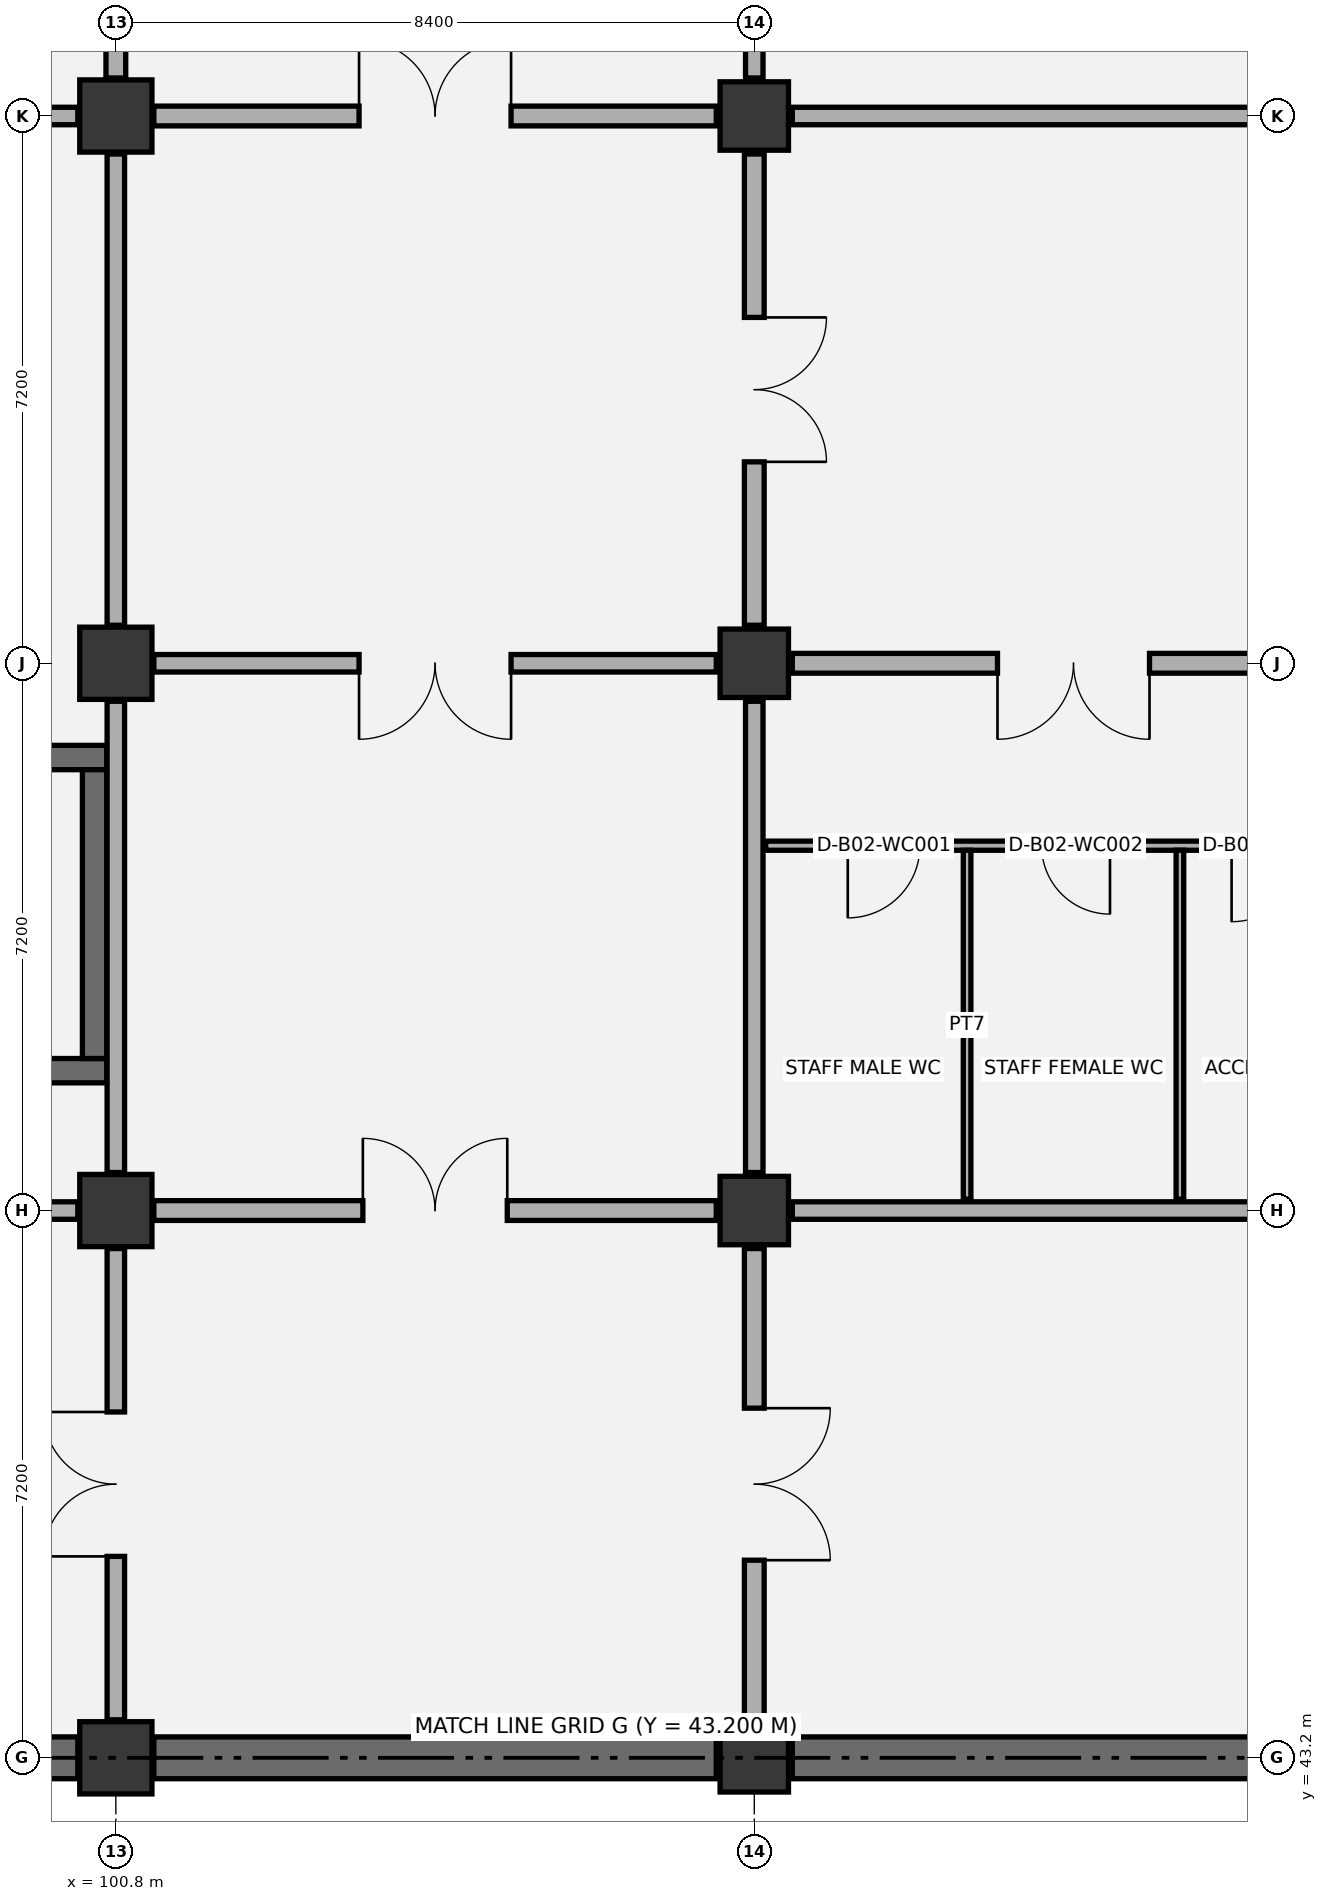
"""IFC4 building model, lengths in metres.
Left out: names, types, materials, properties, quantities, classifications, styles, units other than length and angle.
Written with IfcOpenShell. Run it as: python <this file> out.ifc"""

import sys

from ifc_helpers import new_model, si_unit, direction, frame, frame_2d, origin, origin_2d, place, context, subcontext, project, spatial, rectangle, extrude, element, fill, save


model = new_model("IFC4")
c1 = context("Model", 3, precision=1e-05, world=origin(), true_north=direction((0.0, 1.0)))
c2 = subcontext(c1, "Body", "Model", "MODEL_VIEW")
j1 = project(units=[si_unit("LENGTHUNIT", "METRE"), si_unit("PLANEANGLEUNIT", "RADIAN")], contexts=[c1])
p1 = place(None, origin())
s1 = spatial("IfcSite", under=j1, at=p1, CompositionType="ELEMENT")
p2 = place(p1, origin())
s2 = spatial("IfcBuilding", under=s1, at=p2, CompositionType="ELEMENT")
p3 = place(p2, frame((0.0, 0.0, -9.6)))
s3 = spatial("IfcBuildingStorey", under=s2, at=p3, CompositionType="ELEMENT", Elevation=-9.6)
for number, where, z_axis, x_axis in (
    (1, (100.8, 43.2, 0.0), (0.0, 0.0, 1.0), (1.0, 0.0, 0.0)),
    (2, (100.8, 50.4, 0.0), (0.0, 0.0, 1.0), (1.0, 0.0, 0.0)),
    (3, (100.8, 57.6, 0.0), (0.0, 0.0, 1.0), (1.0, 0.0, 0.0)),
    (4, (100.8, 64.8, 0.0), (0.0, 0.0, 1.0), (1.0, 0.0, 0.0)),
):
    element("IfcColumn", number, at=place(p3, frame(where, z_axis=z_axis, x_axis=x_axis)), inside=s3, PredefinedType="COLUMN", context=c2, shape_type="SweptSolid", body=[
        extrude(rectangle(XDim=0.95, YDim=0.95, at=origin_2d()), origin(), (0.0, 0.0, 1.0), 4.8),
    ])
for number, where, z_axis, x_axis in (
    (5, (109.2, 43.2, 0.0), (0.0, 0.0, 1.0), (1.0, 0.0, 0.0)),
    (6, (109.2, 50.4, 0.0), (0.0, 0.0, 1.0), (1.0, 0.0, 0.0)),
    (7, (109.2, 57.6, 0.0), (0.0, 0.0, 1.0), (1.0, 0.0, 0.0)),
    (8, (109.2, 64.8, 0.0), (0.0, 0.0, 1.0), (1.0, 0.0, 0.0)),
):
    element("IfcColumn", number, at=place(p3, frame(where, z_axis=z_axis, x_axis=x_axis)), inside=s3, PredefinedType="COLUMN", context=c2, shape_type="SweptSolid", body=[
        extrude(rectangle(XDim=0.9, YDim=0.9, at=origin_2d()), origin(), (0.0, 0.0, 1.0), 4.8),
    ])
p4 = place(p3, frame((92.9, 43.2, 0.0), z_axis=(0.0, 0.0, 1.0), x_axis=(1.0, 0.0, 0.0)))
e9 = element("IfcWall", 9, at=p4, inside=s3, PredefinedType="USERDEFINED", context=c2, shape_type="SweptSolid", body=[
    extrude(rectangle(XDim=7.4, YDim=0.55, at=frame_2d((3.7, 0.0))), origin(), (0.0, 0.0, 1.0), 4.4),
])
p5 = place(p3, frame((101.3, 43.2, 0.0), z_axis=(0.0, 0.0, 1.0), x_axis=(1.0, 0.0, 0.0)))
e10 = element("IfcWall", 10, at=p5, inside=s3, PredefinedType="USERDEFINED", context=c2, shape_type="SweptSolid", body=[
    extrude(rectangle(XDim=7.4, YDim=0.55, at=frame_2d((3.7, 0.0))), origin(), (0.0, 0.0, 1.0), 4.4),
])
p6 = place(p3, frame((109.7, 43.2, 0.0), z_axis=(0.0, 0.0, 1.0), x_axis=(1.0, 0.0, 0.0)))
e11 = element("IfcWall", 11, at=p6, inside=s3, PredefinedType="USERDEFINED", context=c2, shape_type="SweptSolid", body=[
    extrude(rectangle(XDim=7.4, YDim=0.55, at=frame_2d((3.7, 0.0))), origin(), (0.0, 0.0, 1.0), 4.4),
])
p7 = place(p3, frame((93.2, 52.24, 0.0), z_axis=(0.0, 0.0, 1.0), x_axis=(1.0, 0.0, 0.0)))
e12 = element("IfcWall", 12, at=p7, inside=s3, PredefinedType="SHEAR", context=c2, shape_type="SweptSolid", body=[
    extrude(rectangle(XDim=7.48, YDim=0.32, at=frame_2d((3.74, 0.0))), origin(), (0.0, 0.0, 1.0), 4.4),
])
p8 = place(p7, frame((0.45, 0.0, 0.0)))
e13 = element("IfcOpeningElement", 13, at=p8, cuts=e12, PredefinedType="OPENING", context=c2, shape_type="SweptSolid", body=[
    extrude(rectangle(XDim=1.05, YDim=2.15, at=frame_2d((0.525, 1.075))), frame((0.0, 0.17, 0.0), z_axis=(0.0, -1.0, 0.0), x_axis=(1.0, 0.0, 0.0)), (0.0, 0.0, 1.0), 0.34),
])
p9 = place(p3, frame((93.2, 56.36, 0.0), z_axis=(0.0, 0.0, 1.0), x_axis=(1.0, 0.0, 0.0)))
e14 = element("IfcWall", 14, at=p9, inside=s3, PredefinedType="SHEAR", context=c2, shape_type="SweptSolid", body=[
    extrude(rectangle(XDim=7.48, YDim=0.32, at=frame_2d((3.74, 0.0))), origin(), (0.0, 0.0, 1.0), 4.4),
])
p10 = place(p3, frame((100.52, 52.4, 0.0), z_axis=(0.0, 0.0, 1.0), x_axis=(0.0, 1.0, 0.0)))
e15 = element("IfcWall", 15, at=p10, inside=s3, PredefinedType="SHEAR", context=c2, shape_type="SweptSolid", body=[
    extrude(rectangle(XDim=3.8, YDim=0.32, at=frame_2d((1.9, 0.0))), origin(), (0.0, 0.0, 1.0), 4.4),
])
p11 = place(p3, frame((109.35, 55.2, 0.0), z_axis=(0.0, 0.0, 1.0), x_axis=(1.0, 0.0, 0.0)))
e16 = element("IfcWall", 16, at=p11, inside=s3, PredefinedType="PARTITIONING", context=c2, shape_type="SweptSolid", body=[
    extrude(rectangle(XDim=8.1, YDim=0.12, at=frame_2d((4.05, 0.0))), origin(), (0.0, 0.0, 1.0), 4.4),
])
p12 = place(p11, frame((1.08, 0.0, 0.0)))
e17 = element("IfcOpeningElement", 17, at=p12, cuts=e16, PredefinedType="OPENING", context=c2, shape_type="SweptSolid", body=[
    extrude(rectangle(XDim=0.95, YDim=2.1, at=frame_2d((0.475, 1.05))), frame((0.0, 0.07, 0.0), z_axis=(0.0, -1.0, 0.0), x_axis=(1.0, 0.0, 0.0)), (0.0, 0.0, 1.0), 0.14),
])
p13 = place(p11, frame((3.63, 0.0, 0.0)))
e18 = element("IfcOpeningElement", 18, at=p13, cuts=e16, PredefinedType="OPENING", context=c2, shape_type="SweptSolid", body=[
    extrude(rectangle(XDim=0.9, YDim=2.1, at=frame_2d((0.45, 1.05))), frame((0.0, 0.07, 0.0), z_axis=(0.0, -1.0, 0.0), x_axis=(1.0, 0.0, 0.0)), (0.0, 0.0, 1.0), 0.14),
])
p14 = place(p11, frame((6.13, 0.0, 0.0)))
e19 = element("IfcOpeningElement", 19, at=p14, cuts=e16, PredefinedType="OPENING", context=c2, shape_type="SweptSolid", body=[
    extrude(rectangle(XDim=1.0, YDim=2.1, at=frame_2d((0.5, 1.05))), frame((0.0, 0.07, 0.0), z_axis=(0.0, -1.0, 0.0), x_axis=(1.0, 0.0, 0.0)), (0.0, 0.0, 1.0), 0.14),
])
for number, where, z_axis, x_axis in (
    (20, (112.0, 50.55, 0.0), (0.0, 0.0, 1.0), (0.0, 1.0, 0.0)),
    (21, (114.8, 50.55, 0.0), (0.0, 0.0, 1.0), (0.0, 1.0, 0.0)),
):
    element("IfcWall", number, at=place(p3, frame(where, z_axis=z_axis, x_axis=x_axis)), inside=s3, PredefinedType="PARTITIONING", context=c2, shape_type="SweptSolid", body=[
        extrude(rectangle(XDim=4.59, YDim=0.1, at=frame_2d((2.295, 0.0))), origin(), (0.0, 0.0, 1.0), 4.4),
    ])
p15 = place(p3, frame((100.8, 43.7, 0.0), z_axis=(0.0, 0.0, 1.0), x_axis=(0.0, 1.0, 0.0)))
e22 = element("IfcWall", 22, at=p15, inside=s3, PredefinedType="PARTITIONING", context=c2, shape_type="SweptSolid", body=[
    extrude(rectangle(XDim=6.2, YDim=0.23, at=frame_2d((3.1, 0.0))), origin(), (0.0, 0.0, 1.0), 3.595),
])
p16 = place(p15, frame((2.15, 0.0, 0.0)))
e23 = element("IfcOpeningElement", 23, at=p16, cuts=e22, PredefinedType="OPENING", context=c2, shape_type="SweptSolid", body=[
    extrude(rectangle(XDim=1.9, YDim=2.3, at=frame_2d((0.95, 1.15))), frame((0.0, 0.125, 0.0), z_axis=(0.0, -1.0, 0.0), x_axis=(1.0, 0.0, 0.0)), (0.0, 0.0, 1.0), 0.25),
])
p17 = place(p3, frame((92.9, 50.4, 0.0), z_axis=(0.0, 0.0, 1.0), x_axis=(1.0, 0.0, 0.0)))
e24 = element("IfcWall", 24, at=p17, inside=s3, PredefinedType="PARTITIONING", context=c2, shape_type="SweptSolid", body=[
    extrude(rectangle(XDim=7.4, YDim=0.23, at=frame_2d((3.7, 0.0))), origin(), (0.0, 0.0, 1.0), 3.495),
])
p18 = place(p17, frame((2.95, 0.0, 0.0)))
e25 = element("IfcOpeningElement", 25, at=p18, cuts=e24, PredefinedType="OPENING", context=c2, shape_type="SweptSolid", body=[
    extrude(rectangle(XDim=1.5, YDim=2.15, at=frame_2d((0.75, 1.075))), frame((0.0, 0.125, 0.0), z_axis=(0.0, -1.0, 0.0), x_axis=(1.0, 0.0, 0.0)), (0.0, 0.0, 1.0), 0.25),
])
p19 = place(p3, frame((100.8, 50.9, 0.0), z_axis=(0.0, 0.0, 1.0), x_axis=(0.0, 1.0, 0.0)))
e26 = element("IfcWall", 26, at=p19, inside=s3, PredefinedType="PARTITIONING", context=c2, shape_type="SweptSolid", body=[
    extrude(rectangle(XDim=6.2, YDim=0.23, at=frame_2d((3.1, 0.0))), origin(), (0.0, 0.0, 1.0), 3.595),
])
p20 = place(p3, frame((100.8, 58.1, 0.0), z_axis=(0.0, 0.0, 1.0), x_axis=(0.0, 1.0, 0.0)))
e27 = element("IfcWall", 27, at=p20, inside=s3, PredefinedType="PARTITIONING", context=c2, shape_type="SweptSolid", body=[
    extrude(rectangle(XDim=6.2, YDim=0.23, at=frame_2d((3.1, 0.0))), origin(), (0.0, 0.0, 1.0), 3.595),
])
p21 = place(p3, frame((92.9, 64.8, 0.0), z_axis=(0.0, 0.0, 1.0), x_axis=(1.0, 0.0, 0.0)))
e28 = element("IfcWall", 28, at=p21, inside=s3, PredefinedType="PARTITIONING", context=c2, shape_type="SweptSolid", body=[
    extrude(rectangle(XDim=7.4, YDim=0.23, at=frame_2d((3.7, 0.0))), origin(), (0.0, 0.0, 1.0), 3.495),
])
p22 = place(p3, frame((100.8, 65.3, 0.0), z_axis=(0.0, 0.0, 1.0), x_axis=(0.0, 1.0, 0.0)))
e29 = element("IfcWall", 29, at=p22, inside=s3, PredefinedType="PARTITIONING", context=c2, shape_type="SweptSolid", body=[
    extrude(rectangle(XDim=6.2, YDim=0.26, at=frame_2d((3.1, 0.0))), origin(), (0.0, 0.0, 1.0), 3.595),
])
p23 = place(p22, frame((2.15, 0.0, 0.0)))
e30 = element("IfcOpeningElement", 30, at=p23, cuts=e29, PredefinedType="OPENING", context=c2, shape_type="SweptSolid", body=[
    extrude(rectangle(XDim=1.9, YDim=2.3, at=frame_2d((0.95, 1.15))), frame((0.0, 0.14, 0.0), z_axis=(0.0, -1.0, 0.0), x_axis=(1.0, 0.0, 0.0)), (0.0, 0.0, 1.0), 0.28),
])
p24 = place(p3, frame((109.2, 43.7, 0.0), z_axis=(0.0, 0.0, 1.0), x_axis=(0.0, 1.0, 0.0)))
e31 = element("IfcWall", 31, at=p24, inside=s3, PredefinedType="PARTITIONING", context=c2, shape_type="SweptSolid", body=[
    extrude(rectangle(XDim=6.2, YDim=0.26, at=frame_2d((3.1, 0.0))), origin(), (0.0, 0.0, 1.0), 3.595),
])
p25 = place(p24, frame((2.1, 0.0, 0.0)))
e32 = element("IfcOpeningElement", 32, at=p25, cuts=e31, PredefinedType="OPENING", context=c2, shape_type="SweptSolid", body=[
    extrude(rectangle(XDim=2.0, YDim=2.35, at=frame_2d((1.0, 1.175))), frame((0.0, 0.14, 0.0), z_axis=(0.0, -1.0, 0.0), x_axis=(1.0, 0.0, 0.0)), (0.0, 0.0, 1.0), 0.28),
])
p26 = place(p3, frame((101.3, 50.4, 0.0), z_axis=(0.0, 0.0, 1.0), x_axis=(1.0, 0.0, 0.0)))
e33 = element("IfcWall", 33, at=p26, inside=s3, PredefinedType="PARTITIONING", context=c2, shape_type="SweptSolid", body=[
    extrude(rectangle(XDim=7.4, YDim=0.26, at=frame_2d((3.7, 0.0))), origin(), (0.0, 0.0, 1.0), 3.495),
])
p27 = place(p26, frame((2.75, 0.0, 0.0)))
e34 = element("IfcOpeningElement", 34, at=p27, cuts=e33, PredefinedType="OPENING", context=c2, shape_type="SweptSolid", body=[
    extrude(rectangle(XDim=1.9, YDim=2.3, at=frame_2d((0.95, 1.15))), frame((0.0, 0.14, 0.0), z_axis=(0.0, -1.0, 0.0), x_axis=(1.0, 0.0, 0.0)), (0.0, 0.0, 1.0), 0.28),
])
p28 = place(p3, frame((109.2, 50.9, 0.0), z_axis=(0.0, 0.0, 1.0), x_axis=(0.0, 1.0, 0.0)))
e35 = element("IfcWall", 35, at=p28, inside=s3, PredefinedType="PARTITIONING", context=c2, shape_type="SweptSolid", body=[
    extrude(rectangle(XDim=6.2, YDim=0.23, at=frame_2d((3.1, 0.0))), origin(), (0.0, 0.0, 1.0), 3.595),
])
p29 = place(p3, frame((101.3, 57.6, 0.0), z_axis=(0.0, 0.0, 1.0), x_axis=(1.0, 0.0, 0.0)))
e36 = element("IfcWall", 36, at=p29, inside=s3, PredefinedType="PARTITIONING", context=c2, shape_type="SweptSolid", body=[
    extrude(rectangle(XDim=7.4, YDim=0.23, at=frame_2d((3.7, 0.0))), origin(), (0.0, 0.0, 1.0), 3.495),
])
p30 = place(p29, frame((2.7, 0.0, 0.0)))
e37 = element("IfcOpeningElement", 37, at=p30, cuts=e36, PredefinedType="OPENING", context=c2, shape_type="SweptSolid", body=[
    extrude(rectangle(XDim=2.0, YDim=2.35, at=frame_2d((1.0, 1.175))), frame((0.0, 0.125, 0.0), z_axis=(0.0, -1.0, 0.0), x_axis=(1.0, 0.0, 0.0)), (0.0, 0.0, 1.0), 0.25),
])
p31 = place(p3, frame((109.2, 58.1, 0.0), z_axis=(0.0, 0.0, 1.0), x_axis=(0.0, 1.0, 0.0)))
e38 = element("IfcWall", 38, at=p31, inside=s3, PredefinedType="PARTITIONING", context=c2, shape_type="SweptSolid", body=[
    extrude(rectangle(XDim=6.2, YDim=0.26, at=frame_2d((3.1, 0.0))), origin(), (0.0, 0.0, 1.0), 3.595),
])
p32 = place(p31, frame((2.15, 0.0, 0.0)))
e39 = element("IfcOpeningElement", 39, at=p32, cuts=e38, PredefinedType="OPENING", context=c2, shape_type="SweptSolid", body=[
    extrude(rectangle(XDim=1.9, YDim=2.3, at=frame_2d((0.95, 1.15))), frame((0.0, 0.14, 0.0), z_axis=(0.0, -1.0, 0.0), x_axis=(1.0, 0.0, 0.0)), (0.0, 0.0, 1.0), 0.28),
])
p33 = place(p3, frame((101.3, 64.8, 0.0), z_axis=(0.0, 0.0, 1.0), x_axis=(1.0, 0.0, 0.0)))
e40 = element("IfcWall", 40, at=p33, inside=s3, PredefinedType="PARTITIONING", context=c2, shape_type="SweptSolid", body=[
    extrude(rectangle(XDim=7.4, YDim=0.26, at=frame_2d((3.7, 0.0))), origin(), (0.0, 0.0, 1.0), 3.495),
])
p34 = place(p33, frame((2.7, 0.0, 0.0)))
e41 = element("IfcOpeningElement", 41, at=p34, cuts=e40, PredefinedType="OPENING", context=c2, shape_type="SweptSolid", body=[
    extrude(rectangle(XDim=2.0, YDim=2.35, at=frame_2d((1.0, 1.175))), frame((0.0, 0.14, 0.0), z_axis=(0.0, -1.0, 0.0), x_axis=(1.0, 0.0, 0.0)), (0.0, 0.0, 1.0), 0.28),
])
p35 = place(p3, frame((109.2, 65.3, 0.0), z_axis=(0.0, 0.0, 1.0), x_axis=(0.0, 1.0, 0.0)))
e42 = element("IfcWall", 42, at=p35, inside=s3, PredefinedType="PARTITIONING", context=c2, shape_type="SweptSolid", body=[
    extrude(rectangle(XDim=6.2, YDim=0.23, at=frame_2d((3.1, 0.0))), origin(), (0.0, 0.0, 1.0), 3.595),
])
p36 = place(p3, frame((109.7, 50.4, 0.0), z_axis=(0.0, 0.0, 1.0), x_axis=(1.0, 0.0, 0.0)))
e43 = element("IfcWall", 43, at=p36, inside=s3, PredefinedType="PARTITIONING", context=c2, shape_type="SweptSolid", body=[
    extrude(rectangle(XDim=7.4, YDim=0.23, at=frame_2d((3.7, 0.0))), origin(), (0.0, 0.0, 1.0), 3.495),
])
p37 = place(p3, frame((109.7, 57.6, 0.0), z_axis=(0.0, 0.0, 1.0), x_axis=(1.0, 0.0, 0.0)))
e44 = element("IfcWall", 44, at=p37, inside=s3, PredefinedType="PARTITIONING", context=c2, shape_type="SweptSolid", body=[
    extrude(rectangle(XDim=7.4, YDim=0.26, at=frame_2d((3.7, 0.0))), origin(), (0.0, 0.0, 1.0), 3.495),
])
p38 = place(p37, frame((2.7, 0.0, 0.0)))
e45 = element("IfcOpeningElement", 45, at=p38, cuts=e44, PredefinedType="OPENING", context=c2, shape_type="SweptSolid", body=[
    extrude(rectangle(XDim=2.0, YDim=2.35, at=frame_2d((1.0, 1.175))), frame((0.0, 0.14, 0.0), z_axis=(0.0, -1.0, 0.0), x_axis=(1.0, 0.0, 0.0)), (0.0, 0.0, 1.0), 0.28),
])
p39 = place(p3, frame((109.7, 64.8, 0.0), z_axis=(0.0, 0.0, 1.0), x_axis=(1.0, 0.0, 0.0)))
e46 = element("IfcWall", 46, at=p39, inside=s3, PredefinedType="PARTITIONING", context=c2, shape_type="SweptSolid", body=[
    extrude(rectangle(XDim=7.4, YDim=0.23, at=frame_2d((3.7, 0.0))), origin(), (0.0, 0.0, 1.0), 3.495),
])
p40 = place(p12, frame((0.95, 0.0, 0.0), z_axis=(0.0, 0.0, 1.0), x_axis=(-1.0, 0.0, 0.0)))
e47 = element("IfcDoor", 47, at=p40, inside=s3, OperationType="SINGLE_SWING_RIGHT", PredefinedType="DOOR", context=c2, shape_type="SweptSolid", body=[
    extrude(rectangle(XDim=0.95, YDim=2.1, at=frame_2d((0.475, 1.05))), frame((0.0, 0.025, 0.0), z_axis=(0.0, -1.0, 0.0), x_axis=(1.0, 0.0, 0.0)), (0.0, 0.0, 1.0), 0.05),
])
fill(e17, e47)
p41 = place(p13, frame((0.9, 0.0, 0.0), z_axis=(0.0, 0.0, 1.0), x_axis=(-1.0, 0.0, 0.0)))
e48 = element("IfcDoor", 48, at=p41, inside=s3, OperationType="SINGLE_SWING_LEFT", PredefinedType="DOOR", context=c2, shape_type="SweptSolid", body=[
    extrude(rectangle(XDim=0.9, YDim=2.1, at=frame_2d((0.45, 1.05))), frame((0.0, 0.025, 0.0), z_axis=(0.0, -1.0, 0.0), x_axis=(1.0, 0.0, 0.0)), (0.0, 0.0, 1.0), 0.05),
])
fill(e18, e48)
p42 = place(p14, frame((1.0, 0.0, 0.0), z_axis=(0.0, 0.0, 1.0), x_axis=(-1.0, 0.0, 0.0)))
e49 = element("IfcDoor", 49, at=p42, inside=s3, OperationType="SINGLE_SWING_RIGHT", PredefinedType="DOOR", context=c2, shape_type="SweptSolid", body=[
    extrude(rectangle(XDim=1.0, YDim=2.1, at=frame_2d((0.5, 1.05))), frame((0.0, 0.025, 0.0), z_axis=(0.0, -1.0, 0.0), x_axis=(1.0, 0.0, 0.0)), (0.0, 0.0, 1.0), 0.05),
])
fill(e19, e49)
p43 = place(p16, origin())
e50 = element("IfcDoor", 50, at=p43, inside=s3, OperationType="DOUBLE_DOOR_SINGLE_SWING", PredefinedType="DOOR", context=c2, shape_type="SweptSolid", body=[
    extrude(rectangle(XDim=1.9, YDim=2.3, at=frame_2d((0.95, 1.15))), frame((0.0, 0.025, 0.0), z_axis=(0.0, -1.0, 0.0), x_axis=(1.0, 0.0, 0.0)), (0.0, 0.0, 1.0), 0.05),
])
fill(e23, e50)
p44 = place(p25, frame((2.0, 0.0, 0.0), z_axis=(0.0, 0.0, 1.0), x_axis=(-1.0, 0.0, 0.0)))
e51 = element("IfcDoor", 51, at=p44, inside=s3, OperationType="DOUBLE_DOOR_SINGLE_SWING", PredefinedType="DOOR", context=c2, shape_type="SweptSolid", body=[
    extrude(rectangle(XDim=2.0, YDim=2.35, at=frame_2d((1.0, 1.175))), frame((0.0, 0.025, 0.0), z_axis=(0.0, -1.0, 0.0), x_axis=(1.0, 0.0, 0.0)), (0.0, 0.0, 1.0), 0.05),
])
fill(e32, e51)
p45 = place(p27, origin())
e52 = element("IfcDoor", 52, at=p45, inside=s3, OperationType="DOUBLE_DOOR_SINGLE_SWING", PredefinedType="DOOR", context=c2, shape_type="SweptSolid", body=[
    extrude(rectangle(XDim=1.9, YDim=2.3, at=frame_2d((0.95, 1.15))), frame((0.0, 0.025, 0.0), z_axis=(0.0, -1.0, 0.0), x_axis=(1.0, 0.0, 0.0)), (0.0, 0.0, 1.0), 0.05),
])
fill(e34, e52)
p46 = place(p30, frame((2.0, 0.0, 0.0), z_axis=(0.0, 0.0, 1.0), x_axis=(-1.0, 0.0, 0.0)))
e53 = element("IfcDoor", 53, at=p46, inside=s3, OperationType="DOUBLE_DOOR_SINGLE_SWING", PredefinedType="DOOR", context=c2, shape_type="SweptSolid", body=[
    extrude(rectangle(XDim=2.0, YDim=2.35, at=frame_2d((1.0, 1.175))), frame((0.0, 0.025, 0.0), z_axis=(0.0, -1.0, 0.0), x_axis=(1.0, 0.0, 0.0)), (0.0, 0.0, 1.0), 0.05),
])
fill(e37, e53)
p47 = place(p32, frame((1.9, 0.0, 0.0), z_axis=(0.0, 0.0, 1.0), x_axis=(-1.0, 0.0, 0.0)))
e54 = element("IfcDoor", 54, at=p47, inside=s3, OperationType="DOUBLE_DOOR_SINGLE_SWING", PredefinedType="DOOR", context=c2, shape_type="SweptSolid", body=[
    extrude(rectangle(XDim=1.9, YDim=2.3, at=frame_2d((0.95, 1.15))), frame((0.0, 0.025, 0.0), z_axis=(0.0, -1.0, 0.0), x_axis=(1.0, 0.0, 0.0)), (0.0, 0.0, 1.0), 0.05),
])
fill(e39, e54)
p48 = place(p34, origin())
e55 = element("IfcDoor", 55, at=p48, inside=s3, OperationType="DOUBLE_DOOR_SINGLE_SWING", PredefinedType="DOOR", context=c2, shape_type="SweptSolid", body=[
    extrude(rectangle(XDim=2.0, YDim=2.35, at=frame_2d((1.0, 1.175))), frame((0.0, 0.025, 0.0), z_axis=(0.0, -1.0, 0.0), x_axis=(1.0, 0.0, 0.0)), (0.0, 0.0, 1.0), 0.05),
])
fill(e41, e55)
p49 = place(p38, frame((2.0, 0.0, 0.0), z_axis=(0.0, 0.0, 1.0), x_axis=(-1.0, 0.0, 0.0)))
e56 = element("IfcDoor", 56, at=p49, inside=s3, OperationType="DOUBLE_DOOR_SINGLE_SWING", PredefinedType="DOOR", context=c2, shape_type="SweptSolid", body=[
    extrude(rectangle(XDim=2.0, YDim=2.35, at=frame_2d((1.0, 1.175))), frame((0.0, 0.025, 0.0), z_axis=(0.0, -1.0, 0.0), x_axis=(1.0, 0.0, 0.0)), (0.0, 0.0, 1.0), 0.05),
])
fill(e45, e56)
save(model, sys.argv[1])
